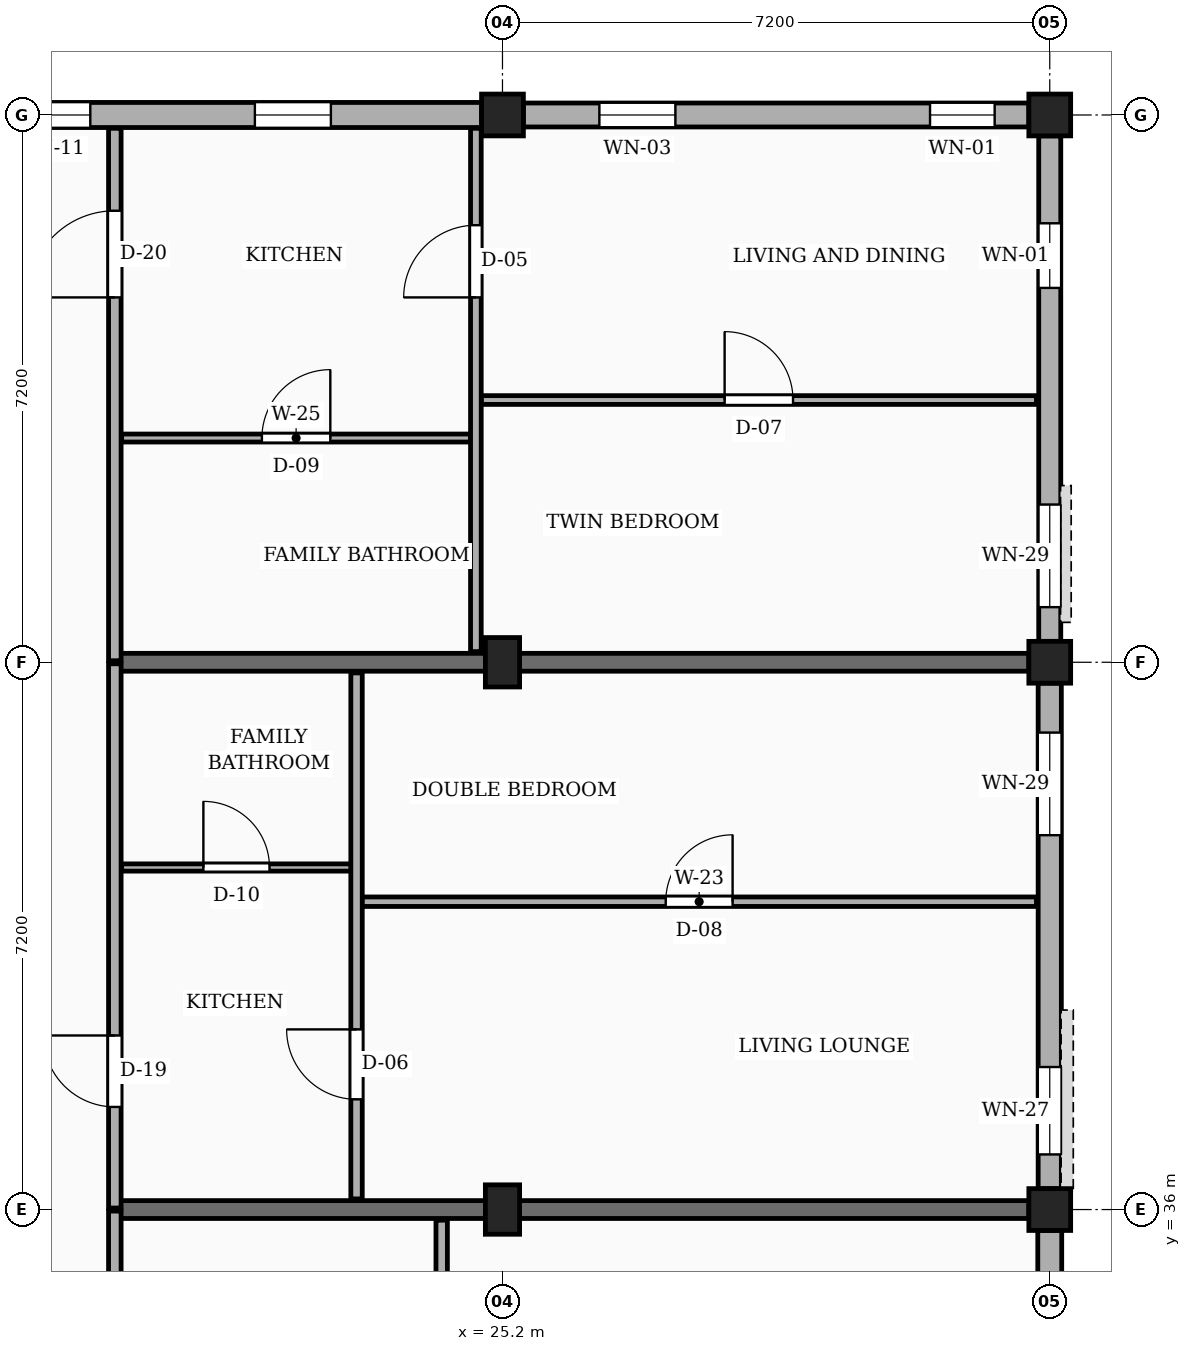
"""IFC4 building model, lengths in metres.
Left out: names, types, materials, properties, quantities, classifications, styles, units other than length and angle.
Written with IfcOpenShell. Run it as: python <this file> out.ifc"""

import sys

from ifc_helpers import new_model, si_unit, direction, frame, frame_2d, origin, origin_2d, place, context, subcontext, project, spatial, rectangle, extrude, element, fill, save


model = new_model("IFC4")
c1 = context("Model", 3, precision=1e-05, world=origin(), true_north=direction((0.0, 1.0)))
c2 = subcontext(c1, "Body", "Model", "MODEL_VIEW")
j1 = project(units=[si_unit("LENGTHUNIT", "METRE"), si_unit("PLANEANGLEUNIT", "RADIAN")], contexts=[c1])
p1 = place(None, origin())
s1 = spatial("IfcSite", under=j1, at=p1, CompositionType="ELEMENT")
p2 = place(p1, origin())
s2 = spatial("IfcBuilding", under=s1, at=p2, CompositionType="ELEMENT")
p3 = place(p2, frame((0.0, 0.0, 17.1)))
s3 = spatial("IfcBuildingStorey", under=s2, at=p3, CompositionType="ELEMENT", Elevation=17.1)
for number, where, z_axis, x_axis in (
    (1, (25.2, 36.0, 0.0), (0.0, 0.0, 1.0), (1.0, 0.0, 0.0)),
    (2, (25.2, 43.2, 0.0), (0.0, 0.0, 1.0), (1.0, 0.0, 0.0)),
):
    element("IfcColumn", number, at=place(p3, frame(where, z_axis=z_axis, x_axis=x_axis)), inside=s3, PredefinedType="COLUMN", context=c2, shape_type="SweptSolid", body=[
        extrude(rectangle(XDim=0.45, YDim=0.65, at=origin_2d()), origin(), (0.0, 0.0, 1.0), 3.15),
    ])
for number, where, z_axis, x_axis in (
    (3, (25.2, 50.4, 0.0), (0.0, 0.0, 1.0), (1.0, 0.0, 0.0)),
    (4, (32.4, 36.0, 0.0), (0.0, 0.0, 1.0), (1.0, 0.0, 0.0)),
    (5, (32.4, 43.2, 0.0), (0.0, 0.0, 1.0), (1.0, 0.0, 0.0)),
    (6, (32.4, 50.4, 0.0), (0.0, 0.0, 1.0), (1.0, 0.0, 0.0)),
):
    element("IfcColumn", number, at=place(p3, frame(where, z_axis=z_axis, x_axis=x_axis)), inside=s3, PredefinedType="COLUMN", context=c2, shape_type="SweptSolid", body=[
        extrude(rectangle(XDim=0.55, YDim=0.55, at=origin_2d()), origin(), (0.0, 0.0, 1.0), 3.15),
    ])
for number, where, z_axis, x_axis in (
    (7, (20.1, 36.0, 0.0), (0.0, 0.0, 1.0), (1.0, 0.0, 0.0)),
    (8, (20.1, 43.2, 0.0), (0.0, 0.0, 1.0), (1.0, 0.0, 0.0)),
):
    element("IfcWall", number, at=place(p3, frame(where, z_axis=z_axis, x_axis=x_axis)), inside=s3, PredefinedType="SOLIDWALL", context=c2, shape_type="SweptSolid", body=[
        extrude(rectangle(XDim=12.025, YDim=0.235, at=frame_2d((6.012, 0.0))), origin(), (0.0, 0.0, 1.0), 2.17),
    ])
p4 = place(p3, frame((32.4, 29.075, 0.0), z_axis=(0.0, 0.0, 1.0), x_axis=(0.0, 1.0, 0.0)))
e9 = element("IfcWall", 9, at=p4, inside=s3, PredefinedType="SOLIDWALL", context=c2, shape_type="SweptSolid", body=[
    extrude(rectangle(XDim=6.65, YDim=0.315, at=frame_2d((3.325, 0.0))), origin(), (0.0, 0.0, 1.0), 2.44),
])
p5 = place(p4, frame((0.45, 0.0, 0.78)))
e10 = element("IfcOpeningElement", 10, at=p5, cuts=e9, PredefinedType="OPENING", context=c2, shape_type="SweptSolid", body=[
    extrude(rectangle(XDim=0.94, YDim=1.44, at=frame_2d((0.47, 0.72))), frame((0.0, 0.167, 0.0), z_axis=(0.0, -1.0, 0.0), x_axis=(1.0, 0.0, 0.0)), (0.0, 0.0, 1.0), 0.335),
])
p6 = place(p4, frame((4.65, 0.0, 0.78)))
e11 = element("IfcOpeningElement", 11, at=p6, cuts=e9, PredefinedType="OPENING", context=c2, shape_type="SweptSolid", body=[
    extrude(rectangle(XDim=1.15, YDim=1.44, at=frame_2d((0.575, 0.72))), frame((0.0, 0.167, 0.0), z_axis=(0.0, -1.0, 0.0), x_axis=(1.0, 0.0, 0.0)), (0.0, 0.0, 1.0), 0.335),
])
p7 = place(p3, frame((32.4, 36.275, 0.0), z_axis=(0.0, 0.0, 1.0), x_axis=(0.0, 1.0, 0.0)))
e12 = element("IfcWall", 12, at=p7, inside=s3, PredefinedType="SOLIDWALL", context=c2, shape_type="SweptSolid", body=[
    extrude(rectangle(XDim=6.65, YDim=0.305, at=frame_2d((3.325, 0.0))), origin(), (0.0, 0.0, 1.0), 2.44),
])
p8 = place(p7, frame((0.45, 0.0, 0.78)))
e13 = element("IfcOpeningElement", 13, at=p8, cuts=e12, PredefinedType="OPENING", context=c2, shape_type="SweptSolid", body=[
    extrude(rectangle(XDim=1.15, YDim=1.44, at=frame_2d((0.575, 0.72))), frame((0.0, 0.163, 0.0), z_axis=(0.0, -1.0, 0.0), x_axis=(1.0, 0.0, 0.0)), (0.0, 0.0, 1.0), 0.325),
])
p9 = place(p7, frame((4.65, 0.0, 0.78)))
e14 = element("IfcOpeningElement", 14, at=p9, cuts=e12, PredefinedType="OPENING", context=c2, shape_type="SweptSolid", body=[
    extrude(rectangle(XDim=1.35, YDim=1.44, at=frame_2d((0.675, 0.72))), frame((0.0, 0.163, 0.0), z_axis=(0.0, -1.0, 0.0), x_axis=(1.0, 0.0, 0.0)), (0.0, 0.0, 1.0), 0.325),
])
p10 = place(p3, frame((32.4, 43.475, 0.0), z_axis=(0.0, 0.0, 1.0), x_axis=(0.0, 1.0, 0.0)))
e15 = element("IfcWall", 15, at=p10, inside=s3, PredefinedType="SOLIDWALL", context=c2, shape_type="SweptSolid", body=[
    extrude(rectangle(XDim=6.65, YDim=0.29, at=frame_2d((3.325, 0.0))), origin(), (0.0, 0.0, 1.0), 2.44),
])
p11 = place(p10, frame((0.45, 0.0, 0.78)))
e16 = element("IfcOpeningElement", 16, at=p11, cuts=e15, PredefinedType="OPENING", context=c2, shape_type="SweptSolid", body=[
    extrude(rectangle(XDim=1.35, YDim=1.44, at=frame_2d((0.675, 0.72))), frame((0.0, 0.155, 0.0), z_axis=(0.0, -1.0, 0.0), x_axis=(1.0, 0.0, 0.0)), (0.0, 0.0, 1.0), 0.31),
])
p12 = place(p10, frame((4.65, 0.0, 0.78)))
e17 = element("IfcOpeningElement", 17, at=p12, cuts=e15, PredefinedType="OPENING", context=c2, shape_type="SweptSolid", body=[
    extrude(rectangle(XDim=0.85, YDim=1.15, at=frame_2d((0.425, 0.575))), frame((0.0, 0.155, 0.0), z_axis=(0.0, -1.0, 0.0), x_axis=(1.0, 0.0, 0.0)), (0.0, 0.0, 1.0), 0.31),
])
p13 = place(p3, frame((32.125, 50.4, 0.0), z_axis=(0.0, 0.0, 1.0), x_axis=(-1.0, 0.0, 0.0)))
e18 = element("IfcWall", 18, at=p13, inside=s3, PredefinedType="SOLIDWALL", context=c2, shape_type="SweptSolid", body=[
    extrude(rectangle(XDim=6.65, YDim=0.315, at=frame_2d((3.325, 0.0))), origin(), (0.0, 0.0, 1.0), 2.44),
])
p14 = place(p13, frame((0.45, 0.0, 0.78)))
e19 = element("IfcOpeningElement", 19, at=p14, cuts=e18, PredefinedType="OPENING", context=c2, shape_type="SweptSolid", body=[
    extrude(rectangle(XDim=0.85, YDim=1.15, at=frame_2d((0.425, 0.575))), frame((0.0, 0.167, 0.0), z_axis=(0.0, -1.0, 0.0), x_axis=(1.0, 0.0, 0.0)), (0.0, 0.0, 1.0), 0.335),
])
p15 = place(p13, frame((4.65, 0.0, 0.78)))
e20 = element("IfcOpeningElement", 20, at=p15, cuts=e18, PredefinedType="OPENING", context=c2, shape_type="SweptSolid", body=[
    extrude(rectangle(XDim=1.0, YDim=1.15, at=frame_2d((0.5, 0.575))), frame((0.0, 0.167, 0.0), z_axis=(0.0, -1.0, 0.0), x_axis=(1.0, 0.0, 0.0)), (0.0, 0.0, 1.0), 0.335),
])
p16 = place(p3, frame((24.925, 50.4, 0.0), z_axis=(0.0, 0.0, 1.0), x_axis=(-1.0, 0.0, 0.0)))
e21 = element("IfcWall", 21, at=p16, inside=s3, PredefinedType="SOLIDWALL", context=c2, shape_type="SweptSolid", body=[
    extrude(rectangle(XDim=6.65, YDim=0.33, at=frame_2d((3.325, 0.0))), origin(), (0.0, 0.0, 1.0), 2.44),
])
p17 = place(p16, frame((1.982, 0.0, 0.78)))
e22 = element("IfcOpeningElement", 22, at=p17, cuts=e21, PredefinedType="OPENING", context=c2, shape_type="SweptSolid", body=[
    extrude(rectangle(XDim=1.0, YDim=1.15, at=frame_2d((0.5, 0.575))), frame((0.0, 0.175, 0.0), z_axis=(0.0, -1.0, 0.0), x_axis=(1.0, 0.0, 0.0)), (0.0, 0.0, 1.0), 0.35),
])
p18 = place(p16, frame((5.147, 0.0, 0.78)))
e23 = element("IfcOpeningElement", 23, at=p18, cuts=e21, PredefinedType="OPENING", context=c2, shape_type="SweptSolid", body=[
    extrude(rectangle(XDim=1.04, YDim=1.26, at=frame_2d((0.52, 0.63))), frame((0.0, 0.175, 0.0), z_axis=(0.0, -1.0, 0.0), x_axis=(1.0, 0.0, 0.0)), (0.0, 0.0, 1.0), 0.35),
])
p19 = place(p3, frame((20.1, 28.82, 0.0), z_axis=(0.0, 0.0, 1.0), x_axis=(0.0, 1.0, 0.0)))
e24 = element("IfcWall", 24, at=p19, inside=s3, PredefinedType="PARTITIONING", context=c2, shape_type="SweptSolid", body=[
    extrude(rectangle(XDim=7.16, YDim=0.165, at=frame_2d((3.58, 0.0))), origin(), (0.0, 0.0, 1.0), 2.305),
])
p20 = place(p19, frame((4.78, 0.0, 0.0)))
e25 = element("IfcOpeningElement", 25, at=p20, cuts=e24, PredefinedType="OPENING", context=c2, shape_type="SweptSolid", body=[
    extrude(rectangle(XDim=1.0, YDim=2.15, at=frame_2d((0.5, 1.075))), frame((0.0, 0.093, 0.0), z_axis=(0.0, -1.0, 0.0), x_axis=(1.0, 0.0, 0.0)), (0.0, 0.0, 1.0), 0.185),
])
p21 = place(p3, frame((20.1, 36.02, 0.0), z_axis=(0.0, 0.0, 1.0), x_axis=(0.0, 1.0, 0.0)))
e26 = element("IfcWall", 26, at=p21, inside=s3, PredefinedType="PARTITIONING", context=c2, shape_type="SweptSolid", body=[
    extrude(rectangle(XDim=7.16, YDim=0.165, at=frame_2d((3.58, 0.0))), origin(), (0.0, 0.0, 1.0), 2.305),
])
p22 = place(p21, frame((1.33, 0.0, 0.0)))
e27 = element("IfcOpeningElement", 27, at=p22, cuts=e26, PredefinedType="OPENING", context=c2, shape_type="SweptSolid", body=[
    extrude(rectangle(XDim=0.94, YDim=2.12, at=frame_2d((0.47, 1.06))), frame((0.0, 0.093, 0.0), z_axis=(0.0, -1.0, 0.0), x_axis=(1.0, 0.0, 0.0)), (0.0, 0.0, 1.0), 0.185),
])
p23 = place(p3, frame((20.1, 43.22, 0.0), z_axis=(0.0, 0.0, 1.0), x_axis=(0.0, 1.0, 0.0)))
e28 = element("IfcWall", 28, at=p23, inside=s3, PredefinedType="PARTITIONING", context=c2, shape_type="SweptSolid", body=[
    extrude(rectangle(XDim=7.005, YDim=0.165, at=frame_2d((3.502, 0.0))), origin(), (0.0, 0.0, 1.0), 2.305),
])
p24 = place(p23, frame((4.78, 0.0, 0.0)))
e29 = element("IfcOpeningElement", 29, at=p24, cuts=e28, PredefinedType="OPENING", context=c2, shape_type="SweptSolid", body=[
    extrude(rectangle(XDim=1.14, YDim=2.18, at=frame_2d((0.57, 1.09))), frame((0.0, 0.093, 0.0), z_axis=(0.0, -1.0, 0.0), x_axis=(1.0, 0.0, 0.0)), (0.0, 0.0, 1.0), 0.185),
])
p25 = place(p3, frame((24.4, 28.94, 0.0), z_axis=(0.0, 0.0, 1.0), x_axis=(0.0, 1.0, 0.0)))
e30 = element("IfcWall", 30, at=p25, inside=s3, PredefinedType="PARTITIONING", context=c2, shape_type="SweptSolid", body=[
    extrude(rectangle(XDim=6.92, YDim=0.15, at=frame_2d((3.46, 0.0))), origin(), (0.0, 0.0, 1.0), 2.305),
])
p26 = place(p25, frame((4.66, 0.0, 0.0)))
e31 = element("IfcOpeningElement", 31, at=p26, cuts=e30, PredefinedType="OPENING", context=c2, shape_type="SweptSolid", body=[
    extrude(rectangle(XDim=0.95, YDim=2.1, at=frame_2d((0.475, 1.05))), frame((0.0, 0.085, 0.0), z_axis=(0.0, -1.0, 0.0), x_axis=(1.0, 0.0, 0.0)), (0.0, 0.0, 1.0), 0.17),
])
p27 = place(p3, frame((23.35, 40.05, 0.0), z_axis=(0.0, 0.0, 1.0), x_axis=(1.0, 0.0, 0.0)))
e32 = element("IfcWall", 32, at=p27, inside=s3, PredefinedType="PARTITIONING", context=c2, shape_type="SweptSolid", body=[
    extrude(rectangle(XDim=8.875, YDim=0.125, at=frame_2d((4.438, 0.0))), origin(), (0.0, 0.0, 1.0), 2.305),
])
p28 = place(p27, frame((3.998, 0.0, 0.0)))
e33 = element("IfcOpeningElement", 33, at=p28, cuts=e32, PredefinedType="OPENING", context=c2, shape_type="SweptSolid", body=[
    extrude(rectangle(XDim=0.88, YDim=2.08, at=frame_2d((0.44, 1.04))), frame((0.0, 0.073, 0.0), z_axis=(0.0, -1.0, 0.0), x_axis=(1.0, 0.0, 0.0)), (0.0, 0.0, 1.0), 0.145),
])
p29 = place(p3, frame((20.19, 40.5, 0.0), z_axis=(0.0, 0.0, 1.0), x_axis=(1.0, 0.0, 0.0)))
e34 = element("IfcWall", 34, at=p29, inside=s3, PredefinedType="PARTITIONING", context=c2, shape_type="SweptSolid", body=[
    extrude(rectangle(XDim=3.02, YDim=0.095, at=frame_2d((1.51, 0.0))), origin(), (0.0, 0.0, 1.0), 2.305),
])
p30 = place(p29, frame((1.075, 0.0, 0.0)))
e35 = element("IfcOpeningElement", 35, at=p30, cuts=e34, PredefinedType="OPENING", context=c2, shape_type="SweptSolid", body=[
    extrude(rectangle(XDim=0.87, YDim=2.05, at=frame_2d((0.435, 1.025))), frame((0.0, 0.058, 0.0), z_axis=(0.0, -1.0, 0.0), x_axis=(1.0, 0.0, 0.0)), (0.0, 0.0, 1.0), 0.115),
])
p31 = place(p3, frame((23.28, 36.14, 0.0), z_axis=(0.0, 0.0, 1.0), x_axis=(0.0, 1.0, 0.0)))
e36 = element("IfcWall", 36, at=p31, inside=s3, PredefinedType="PARTITIONING", context=c2, shape_type="SweptSolid", body=[
    extrude(rectangle(XDim=6.92, YDim=0.15, at=frame_2d((3.46, 0.0))), origin(), (0.0, 0.0, 1.0), 2.305),
])
p32 = place(p31, frame((1.31, 0.0, 0.0)))
e37 = element("IfcOpeningElement", 37, at=p32, cuts=e36, PredefinedType="OPENING", context=c2, shape_type="SweptSolid", body=[
    extrude(rectangle(XDim=0.92, YDim=2.1, at=frame_2d((0.46, 1.05))), frame((0.0, 0.085, 0.0), z_axis=(0.0, -1.0, 0.0), x_axis=(1.0, 0.0, 0.0)), (0.0, 0.0, 1.0), 0.17),
])
p33 = place(p3, frame((24.92, 46.65, 0.0), z_axis=(0.0, 0.0, 1.0), x_axis=(1.0, 0.0, 0.0)))
e38 = element("IfcWall", 38, at=p33, inside=s3, PredefinedType="PARTITIONING", context=c2, shape_type="SweptSolid", body=[
    extrude(rectangle(XDim=7.305, YDim=0.115, at=frame_2d((3.653, 0.0))), origin(), (0.0, 0.0, 1.0), 2.305),
])
p34 = place(p33, frame((3.202, 0.0, 0.0)))
e39 = element("IfcOpeningElement", 39, at=p34, cuts=e38, PredefinedType="OPENING", context=c2, shape_type="SweptSolid", body=[
    extrude(rectangle(XDim=0.9, YDim=2.1, at=frame_2d((0.45, 1.05))), frame((0.0, 0.067, 0.0), z_axis=(0.0, -1.0, 0.0), x_axis=(1.0, 0.0, 0.0)), (0.0, 0.0, 1.0), 0.135),
])
p35 = place(p3, frame((20.19, 46.15, 0.0), z_axis=(0.0, 0.0, 1.0), x_axis=(1.0, 0.0, 0.0)))
e40 = element("IfcWall", 40, at=p35, inside=s3, PredefinedType="PARTITIONING", context=c2, shape_type="SweptSolid", body=[
    extrude(rectangle(XDim=4.59, YDim=0.105, at=frame_2d((2.295, 0.0))), origin(), (0.0, 0.0, 1.0), 2.305),
])
p36 = place(p35, frame((1.845, 0.0, 0.0)))
e41 = element("IfcOpeningElement", 41, at=p36, cuts=e40, PredefinedType="OPENING", context=c2, shape_type="SweptSolid", body=[
    extrude(rectangle(XDim=0.9, YDim=2.05, at=frame_2d((0.45, 1.025))), frame((0.0, 0.062, 0.0), z_axis=(0.0, -1.0, 0.0), x_axis=(1.0, 0.0, 0.0)), (0.0, 0.0, 1.0), 0.125),
])
p37 = place(p3, frame((24.85, 43.34, 0.0), z_axis=(0.0, 0.0, 1.0), x_axis=(0.0, 1.0, 0.0)))
e42 = element("IfcWall", 42, at=p37, inside=s3, PredefinedType="PARTITIONING", context=c2, shape_type="SweptSolid", body=[
    extrude(rectangle(XDim=6.885, YDim=0.14, at=frame_2d((3.442, 0.0))), origin(), (0.0, 0.0, 1.0), 2.305),
])
p38 = place(p37, frame((4.66, 0.0, 0.0)))
e43 = element("IfcOpeningElement", 43, at=p38, cuts=e42, PredefinedType="OPENING", context=c2, shape_type="SweptSolid", body=[
    extrude(rectangle(XDim=0.95, YDim=2.1, at=frame_2d((0.475, 1.05))), frame((0.0, 0.08, 0.0), z_axis=(0.0, -1.0, 0.0), x_axis=(1.0, 0.0, 0.0)), (0.0, 0.0, 1.0), 0.16),
])
p39 = place(p8, origin())
e44 = element("IfcWindow", 44, at=p39, inside=s3, PartitioningType="SINGLE_PANEL", PredefinedType="WINDOW", context=c2, shape_type="SweptSolid", body=[
    extrude(rectangle(XDim=1.15, YDim=1.44, at=frame_2d((0.575, 0.72))), frame((0.0, 0.03, 0.0), z_axis=(0.0, -1.0, 0.0), x_axis=(1.0, 0.0, 0.0)), (0.0, 0.0, 1.0), 0.06),
])
fill(e13, e44)
p40 = place(p9, origin())
e45 = element("IfcWindow", 45, at=p40, inside=s3, PartitioningType="SINGLE_PANEL", PredefinedType="WINDOW", context=c2, shape_type="SweptSolid", body=[
    extrude(rectangle(XDim=1.35, YDim=1.44, at=frame_2d((0.675, 0.72))), frame((0.0, 0.03, 0.0), z_axis=(0.0, -1.0, 0.0), x_axis=(1.0, 0.0, 0.0)), (0.0, 0.0, 1.0), 0.06),
])
fill(e14, e45)
p41 = place(p11, origin())
e46 = element("IfcWindow", 46, at=p41, inside=s3, PartitioningType="SINGLE_PANEL", PredefinedType="WINDOW", context=c2, shape_type="SweptSolid", body=[
    extrude(rectangle(XDim=1.35, YDim=1.44, at=frame_2d((0.675, 0.72))), frame((0.0, 0.03, 0.0), z_axis=(0.0, -1.0, 0.0), x_axis=(1.0, 0.0, 0.0)), (0.0, 0.0, 1.0), 0.06),
])
fill(e16, e46)
p42 = place(p12, origin())
e47 = element("IfcWindow", 47, at=p42, inside=s3, PartitioningType="SINGLE_PANEL", PredefinedType="WINDOW", context=c2, shape_type="SweptSolid", body=[
    extrude(rectangle(XDim=0.85, YDim=1.15, at=frame_2d((0.425, 0.575))), frame((0.0, 0.03, 0.0), z_axis=(0.0, -1.0, 0.0), x_axis=(1.0, 0.0, 0.0)), (0.0, 0.0, 1.0), 0.06),
])
fill(e17, e47)
p43 = place(p14, origin())
e48 = element("IfcWindow", 48, at=p43, inside=s3, PartitioningType="SINGLE_PANEL", PredefinedType="WINDOW", context=c2, shape_type="SweptSolid", body=[
    extrude(rectangle(XDim=0.85, YDim=1.15, at=frame_2d((0.425, 0.575))), frame((0.0, 0.03, 0.0), z_axis=(0.0, -1.0, 0.0), x_axis=(1.0, 0.0, 0.0)), (0.0, 0.0, 1.0), 0.06),
])
fill(e19, e48)
p44 = place(p15, origin())
e49 = element("IfcWindow", 49, at=p44, inside=s3, PartitioningType="SINGLE_PANEL", PredefinedType="WINDOW", context=c2, shape_type="SweptSolid", body=[
    extrude(rectangle(XDim=1.0, YDim=1.15, at=frame_2d((0.5, 0.575))), frame((0.0, 0.03, 0.0), z_axis=(0.0, -1.0, 0.0), x_axis=(1.0, 0.0, 0.0)), (0.0, 0.0, 1.0), 0.06),
])
fill(e20, e49)
p45 = place(p17, origin())
e50 = element("IfcWindow", 50, at=p45, inside=s3, PartitioningType="SINGLE_PANEL", PredefinedType="WINDOW", context=c2, shape_type="SweptSolid", body=[
    extrude(rectangle(XDim=1.0, YDim=1.15, at=frame_2d((0.5, 0.575))), frame((0.0, 0.03, 0.0), z_axis=(0.0, -1.0, 0.0), x_axis=(1.0, 0.0, 0.0)), (0.0, 0.0, 1.0), 0.06),
])
fill(e22, e50)
p46 = place(p18, origin())
e51 = element("IfcWindow", 51, at=p46, inside=s3, PartitioningType="SINGLE_PANEL", PredefinedType="WINDOW", context=c2, shape_type="SweptSolid", body=[
    extrude(rectangle(XDim=1.04, YDim=1.26, at=frame_2d((0.52, 0.63))), frame((0.0, 0.03, 0.0), z_axis=(0.0, -1.0, 0.0), x_axis=(1.0, 0.0, 0.0)), (0.0, 0.0, 1.0), 0.06),
])
fill(e23, e51)
p47 = place(p22, origin())
e52 = element("IfcDoor", 52, at=p47, inside=s3, OperationType="SINGLE_SWING_RIGHT", PredefinedType="DOOR", context=c2, shape_type="SweptSolid", body=[
    extrude(rectangle(XDim=0.94, YDim=2.12, at=frame_2d((0.47, 1.06))), frame((0.0, 0.025, 0.0), z_axis=(0.0, -1.0, 0.0), x_axis=(1.0, 0.0, 0.0)), (0.0, 0.0, 1.0), 0.05),
])
fill(e27, e52)
p48 = place(p24, origin())
e53 = element("IfcDoor", 53, at=p48, inside=s3, OperationType="SINGLE_SWING_LEFT", PredefinedType="DOOR", context=c2, shape_type="SweptSolid", body=[
    extrude(rectangle(XDim=1.14, YDim=2.18, at=frame_2d((0.57, 1.09))), frame((0.0, 0.025, 0.0), z_axis=(0.0, -1.0, 0.0), x_axis=(1.0, 0.0, 0.0)), (0.0, 0.0, 1.0), 0.05),
])
fill(e29, e53)
p49 = place(p28, origin())
e54 = element("IfcDoor", 54, at=p49, inside=s3, OperationType="SINGLE_SWING_RIGHT", PredefinedType="DOOR", context=c2, shape_type="SweptSolid", body=[
    extrude(rectangle(XDim=0.88, YDim=2.08, at=frame_2d((0.44, 1.04))), frame((0.0, 0.025, 0.0), z_axis=(0.0, -1.0, 0.0), x_axis=(1.0, 0.0, 0.0)), (0.0, 0.0, 1.0), 0.05),
])
fill(e33, e54)
p50 = place(p30, origin())
e55 = element("IfcDoor", 55, at=p50, inside=s3, OperationType="SINGLE_SWING_LEFT", PredefinedType="DOOR", context=c2, shape_type="SweptSolid", body=[
    extrude(rectangle(XDim=0.87, YDim=2.05, at=frame_2d((0.435, 1.025))), frame((0.0, 0.025, 0.0), z_axis=(0.0, -1.0, 0.0), x_axis=(1.0, 0.0, 0.0)), (0.0, 0.0, 1.0), 0.05),
])
fill(e35, e55)
p51 = place(p32, origin())
e56 = element("IfcDoor", 56, at=p51, inside=s3, OperationType="SINGLE_SWING_RIGHT", PredefinedType="DOOR", context=c2, shape_type="SweptSolid", body=[
    extrude(rectangle(XDim=0.92, YDim=2.1, at=frame_2d((0.46, 1.05))), frame((0.0, 0.025, 0.0), z_axis=(0.0, -1.0, 0.0), x_axis=(1.0, 0.0, 0.0)), (0.0, 0.0, 1.0), 0.05),
])
fill(e37, e56)
p52 = place(p34, origin())
e57 = element("IfcDoor", 57, at=p52, inside=s3, OperationType="SINGLE_SWING_LEFT", PredefinedType="DOOR", context=c2, shape_type="SweptSolid", body=[
    extrude(rectangle(XDim=0.9, YDim=2.1, at=frame_2d((0.45, 1.05))), frame((0.0, 0.025, 0.0), z_axis=(0.0, -1.0, 0.0), x_axis=(1.0, 0.0, 0.0)), (0.0, 0.0, 1.0), 0.05),
])
fill(e39, e57)
p53 = place(p36, origin())
e58 = element("IfcDoor", 58, at=p53, inside=s3, OperationType="SINGLE_SWING_RIGHT", PredefinedType="DOOR", context=c2, shape_type="SweptSolid", body=[
    extrude(rectangle(XDim=0.9, YDim=2.05, at=frame_2d((0.45, 1.025))), frame((0.0, 0.025, 0.0), z_axis=(0.0, -1.0, 0.0), x_axis=(1.0, 0.0, 0.0)), (0.0, 0.0, 1.0), 0.05),
])
fill(e41, e58)
p54 = place(p38, origin())
e59 = element("IfcDoor", 59, at=p54, inside=s3, OperationType="SINGLE_SWING_LEFT", PredefinedType="DOOR", context=c2, shape_type="SweptSolid", body=[
    extrude(rectangle(XDim=0.95, YDim=2.1, at=frame_2d((0.475, 1.05))), frame((0.0, 0.025, 0.0), z_axis=(0.0, -1.0, 0.0), x_axis=(1.0, 0.0, 0.0)), (0.0, 0.0, 1.0), 0.05),
])
fill(e43, e59)
save(model, sys.argv[1])
